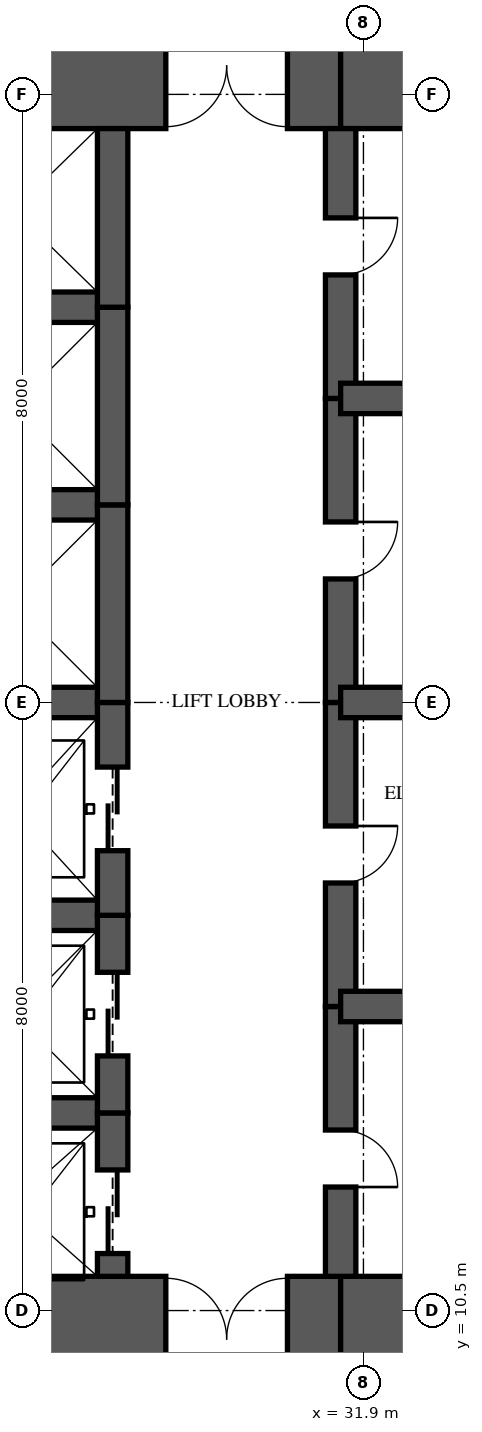
"""IFC4 building model, lengths in metres.
Left out: names, types, materials, properties, quantities, classifications, styles, units other than length and angle.
Written with IfcOpenShell. Run it as: python <this file> out.ifc"""

import sys

from ifc_helpers import new_model, si_unit, direction, frame, frame_2d, origin, place, context, subcontext, project, spatial, rectangle, extrude, element, fill, save


model = new_model("IFC4")
c1 = context("Model", 3, precision=1e-05, world=origin(), true_north=direction((0.0, 1.0)))
c2 = subcontext(c1, "Body", "Model", "MODEL_VIEW")
j1 = project(units=[si_unit("LENGTHUNIT", "METRE"), si_unit("PLANEANGLEUNIT", "RADIAN")], contexts=[c1])
p1 = place(None, origin())
s1 = spatial("IfcSite", under=j1, at=p1, CompositionType="ELEMENT")
p2 = place(p1, origin())
s2 = spatial("IfcBuilding", under=s1, at=p2, CompositionType="ELEMENT")
p3 = place(p2, frame((0.0, 0.0, 44.45)))
s3 = spatial("IfcBuildingStorey", under=s2, at=p3, CompositionType="ELEMENT", Elevation=44.45)
p4 = place(p3, frame((26.0, 10.125, 0.0), z_axis=(0.0, 0.0, 1.0), x_axis=(1.0, 0.0, 0.0)))
e1 = element("IfcWall", 1, at=p4, inside=s3, PredefinedType="SHEAR", context=c2, shape_type="SweptSolid", body=[
    extrude(rectangle(XDim=5.6, YDim=1.65, at=frame_2d((2.8, 0.0))), origin(), (0.0, 0.0, 1.0), 3.35),
])
p5 = place(p4, frame((3.3, 0.0, 0.0)))
e2 = element("IfcOpeningElement", 2, at=p5, cuts=e1, PredefinedType="OPENING", context=c2, shape_type="SweptSolid", body=[
    extrude(rectangle(XDim=1.6, YDim=2.1, at=frame_2d((0.8, 1.05))), frame((0.0, 0.835, 0.0), z_axis=(0.0, -1.0, 0.0), x_axis=(1.0, 0.0, 0.0)), (0.0, 0.0, 1.0), 1.67),
])
for number, where, z_axis, x_axis in (
    (3, (31.6, 10.125, 0.0), (0.0, 0.0, 1.0), (1.0, 0.0, 0.0)),
    (4, (35.9, 26.875, 0.0), (0.0, 0.0, 1.0), (-1.0, 0.0, 0.0)),
):
    element("IfcWall", number, at=place(p3, frame(where, z_axis=z_axis, x_axis=x_axis)), inside=s3, PredefinedType="SHEAR", context=c2, shape_type="SweptSolid", body=[
        extrude(rectangle(XDim=4.3, YDim=1.65, at=frame_2d((2.15, 0.0))), origin(), (0.0, 0.0, 1.0), 3.35),
    ])
p6 = place(p3, frame((31.6, 26.875, 0.0), z_axis=(0.0, 0.0, 1.0), x_axis=(-1.0, 0.0, 0.0)))
e5 = element("IfcWall", 5, at=p6, inside=s3, PredefinedType="SHEAR", context=c2, shape_type="SweptSolid", body=[
    extrude(rectangle(XDim=5.6, YDim=1.65, at=frame_2d((2.8, 0.0))), origin(), (0.0, 0.0, 1.0), 3.35),
])
p7 = place(p6, frame((0.7, 0.0, 0.0)))
e6 = element("IfcOpeningElement", 6, at=p7, cuts=e5, PredefinedType="OPENING", context=c2, shape_type="SweptSolid", body=[
    extrude(rectangle(XDim=1.6, YDim=2.1, at=frame_2d((0.8, 1.05))), frame((0.0, 0.835, 0.0), z_axis=(0.0, -1.0, 0.0), x_axis=(1.0, 0.0, 0.0)), (0.0, 0.0, 1.0), 1.67),
])
p8 = place(p3, frame((28.6, 10.95, 0.0), z_axis=(0.0, 0.0, 1.0), x_axis=(0.0, 1.0, 0.0)))
e7 = element("IfcWall", 7, at=p8, inside=s3, PredefinedType="SHEAR", context=c2, shape_type="SweptSolid", body=[
    extrude(rectangle(XDim=2.15, YDim=0.4, at=frame_2d((1.075, 0.0))), origin(), (0.0, 0.0, 1.0), 3.35),
])
p9 = place(p8, frame((0.3, 0.0, 0.0)))
e8 = element("IfcOpeningElement", 8, at=p9, cuts=e7, PredefinedType="OPENING", context=c2, shape_type="SweptSolid", body=[
    extrude(rectangle(XDim=1.1, YDim=2.1, at=frame_2d((0.55, 1.05))), frame((0.0, 0.21, 0.0), z_axis=(0.0, -1.0, 0.0), x_axis=(1.0, 0.0, 0.0)), (0.0, 0.0, 1.0), 0.42),
])
p10 = place(p3, frame((28.6, 13.1, 0.0), z_axis=(0.0, 0.0, 1.0), x_axis=(0.0, 1.0, 0.0)))
e9 = element("IfcWall", 9, at=p10, inside=s3, PredefinedType="SHEAR", context=c2, shape_type="SweptSolid", body=[
    extrude(rectangle(XDim=2.6, YDim=0.4, at=frame_2d((1.3, 0.0))), origin(), (0.0, 0.0, 1.0), 3.35),
])
p11 = place(p10, frame((0.75, 0.0, 0.0)))
e10 = element("IfcOpeningElement", 10, at=p11, cuts=e9, PredefinedType="OPENING", context=c2, shape_type="SweptSolid", body=[
    extrude(rectangle(XDim=1.1, YDim=2.1, at=frame_2d((0.55, 1.05))), frame((0.0, 0.21, 0.0), z_axis=(0.0, -1.0, 0.0), x_axis=(1.0, 0.0, 0.0)), (0.0, 0.0, 1.0), 0.42),
])
p12 = place(p3, frame((28.6, 15.7, 0.0), z_axis=(0.0, 0.0, 1.0), x_axis=(0.0, 1.0, 0.0)))
e11 = element("IfcWall", 11, at=p12, inside=s3, PredefinedType="SHEAR", context=c2, shape_type="SweptSolid", body=[
    extrude(rectangle(XDim=2.8, YDim=0.4, at=frame_2d((1.4, 0.0))), origin(), (0.0, 0.0, 1.0), 3.35),
])
p13 = place(p12, frame((0.85, 0.0, 0.0)))
e12 = element("IfcOpeningElement", 12, at=p13, cuts=e11, PredefinedType="OPENING", context=c2, shape_type="SweptSolid", body=[
    extrude(rectangle(XDim=1.1, YDim=2.1, at=frame_2d((0.55, 1.05))), frame((0.0, 0.21, 0.0), z_axis=(0.0, -1.0, 0.0), x_axis=(1.0, 0.0, 0.0)), (0.0, 0.0, 1.0), 0.42),
])
p14 = place(p3, frame((28.6, 18.5, 0.0), z_axis=(0.0, 0.0, 1.0), x_axis=(0.0, 1.0, 0.0)))
e13 = element("IfcWall", 13, at=p14, inside=s3, PredefinedType="SHEAR", context=c2, shape_type="SweptSolid", body=[
    extrude(rectangle(XDim=2.6, YDim=0.4, at=frame_2d((1.3, 0.0))), origin(), (0.0, 0.0, 1.0), 3.35),
])
p15 = place(p3, frame((28.6, 21.1, 0.0), z_axis=(0.0, 0.0, 1.0), x_axis=(0.0, 1.0, 0.0)))
e14 = element("IfcWall", 14, at=p15, inside=s3, PredefinedType="SHEAR", context=c2, shape_type="SweptSolid", body=[
    extrude(rectangle(XDim=2.6, YDim=0.4, at=frame_2d((1.3, 0.0))), origin(), (0.0, 0.0, 1.0), 3.35),
])
p16 = place(p3, frame((28.6, 23.7, 0.0), z_axis=(0.0, 0.0, 1.0), x_axis=(0.0, 1.0, 0.0)))
e15 = element("IfcWall", 15, at=p16, inside=s3, PredefinedType="SHEAR", context=c2, shape_type="SweptSolid", body=[
    extrude(rectangle(XDim=2.35, YDim=0.4, at=frame_2d((1.175, 0.0))), origin(), (0.0, 0.0, 1.0), 3.35),
])
p17 = place(p3, frame((31.6, 10.95, 0.0), z_axis=(0.0, 0.0, 1.0), x_axis=(0.0, 1.0, 0.0)))
e16 = element("IfcWall", 16, at=p17, inside=s3, PredefinedType="SHEAR", context=c2, shape_type="SweptSolid", body=[
    extrude(rectangle(XDim=3.55, YDim=0.4, at=frame_2d((1.775, 0.0))), origin(), (0.0, 0.0, 1.0), 3.35),
])
p18 = place(p17, frame((1.175, 0.0, 0.0)))
e17 = element("IfcOpeningElement", 17, at=p18, cuts=e16, PredefinedType="OPENING", context=c2, shape_type="SweptSolid", body=[
    extrude(rectangle(XDim=0.75, YDim=2.1, at=frame_2d((0.375, 1.05))), frame((0.0, 0.21, 0.0), z_axis=(0.0, -1.0, 0.0), x_axis=(1.0, 0.0, 0.0)), (0.0, 0.0, 1.0), 0.42),
])
p19 = place(p3, frame((31.6, 14.5, 0.0), z_axis=(0.0, 0.0, 1.0), x_axis=(0.0, 1.0, 0.0)))
e18 = element("IfcWall", 18, at=p19, inside=s3, PredefinedType="SHEAR", context=c2, shape_type="SweptSolid", body=[
    extrude(rectangle(XDim=4.0, YDim=0.4, at=frame_2d((2.0, 0.0))), origin(), (0.0, 0.0, 1.0), 3.35),
])
p20 = place(p19, frame((1.625, 0.0, 0.0)))
e19 = element("IfcOpeningElement", 19, at=p20, cuts=e18, PredefinedType="OPENING", context=c2, shape_type="SweptSolid", body=[
    extrude(rectangle(XDim=0.75, YDim=2.1, at=frame_2d((0.375, 1.05))), frame((0.0, 0.21, 0.0), z_axis=(0.0, -1.0, 0.0), x_axis=(1.0, 0.0, 0.0)), (0.0, 0.0, 1.0), 0.42),
])
p21 = place(p3, frame((31.6, 18.5, 0.0), z_axis=(0.0, 0.0, 1.0), x_axis=(0.0, 1.0, 0.0)))
e20 = element("IfcWall", 20, at=p21, inside=s3, PredefinedType="SHEAR", context=c2, shape_type="SweptSolid", body=[
    extrude(rectangle(XDim=4.0, YDim=0.4, at=frame_2d((2.0, 0.0))), origin(), (0.0, 0.0, 1.0), 3.35),
])
p22 = place(p21, frame((1.625, 0.0, 0.0)))
e21 = element("IfcOpeningElement", 21, at=p22, cuts=e20, PredefinedType="OPENING", context=c2, shape_type="SweptSolid", body=[
    extrude(rectangle(XDim=0.75, YDim=2.1, at=frame_2d((0.375, 1.05))), frame((0.0, 0.21, 0.0), z_axis=(0.0, -1.0, 0.0), x_axis=(1.0, 0.0, 0.0)), (0.0, 0.0, 1.0), 0.42),
])
p23 = place(p3, frame((31.6, 22.5, 0.0), z_axis=(0.0, 0.0, 1.0), x_axis=(0.0, 1.0, 0.0)))
e22 = element("IfcWall", 22, at=p23, inside=s3, PredefinedType="SHEAR", context=c2, shape_type="SweptSolid", body=[
    extrude(rectangle(XDim=3.55, YDim=0.4, at=frame_2d((1.775, 0.0))), origin(), (0.0, 0.0, 1.0), 3.35),
])
p24 = place(p23, frame((1.625, 0.0, 0.0)))
e23 = element("IfcOpeningElement", 23, at=p24, cuts=e22, PredefinedType="OPENING", context=c2, shape_type="SweptSolid", body=[
    extrude(rectangle(XDim=0.75, YDim=2.1, at=frame_2d((0.375, 1.05))), frame((0.0, 0.21, 0.0), z_axis=(0.0, -1.0, 0.0), x_axis=(1.0, 0.0, 0.0)), (0.0, 0.0, 1.0), 0.42),
])
for number, where, z_axis, x_axis in (
    (24, (26.0, 13.1, 0.0), (0.0, 0.0, 1.0), (1.0, 0.0, 0.0)),
    (25, (26.0, 15.7, 0.0), (0.0, 0.0, 1.0), (1.0, 0.0, 0.0)),
    (26, (26.0, 18.5, 0.0), (0.0, 0.0, 1.0), (1.0, 0.0, 0.0)),
    (27, (26.0, 21.1, 0.0), (0.0, 0.0, 1.0), (1.0, 0.0, 0.0)),
    (28, (26.0, 23.7, 0.0), (0.0, 0.0, 1.0), (1.0, 0.0, 0.0)),
):
    element("IfcWall", number, at=place(p3, frame(where, z_axis=z_axis, x_axis=x_axis)), inside=s3, PredefinedType="SHEAR", context=c2, shape_type="SweptSolid", body=[
        extrude(rectangle(XDim=2.6, YDim=0.4, at=frame_2d((1.3, 0.0))), origin(), (0.0, 0.0, 1.0), 3.35),
    ])
for number, where, z_axis, x_axis in (
    (29, (31.6, 14.5, 0.0), (0.0, 0.0, 1.0), (1.0, 0.0, 0.0)),
    (30, (31.6, 18.5, 0.0), (0.0, 0.0, 1.0), (1.0, 0.0, 0.0)),
    (31, (31.6, 22.5, 0.0), (0.0, 0.0, 1.0), (1.0, 0.0, 0.0)),
):
    element("IfcWall", number, at=place(p3, frame(where, z_axis=z_axis, x_axis=x_axis)), inside=s3, PredefinedType="SHEAR", context=c2, shape_type="SweptSolid", body=[
        extrude(rectangle(XDim=4.3, YDim=0.4, at=frame_2d((2.15, 0.0))), origin(), (0.0, 0.0, 1.0), 3.35),
    ])
p25 = place(p9, origin())
e32 = element("IfcDoor", 32, at=p25, inside=s3, OperationType="SLIDING_TO_LEFT", PredefinedType="DOOR", context=c2, shape_type="SweptSolid", body=[
    extrude(rectangle(XDim=1.1, YDim=2.1, at=frame_2d((0.55, 1.05))), frame((0.0, 0.025, 0.0), z_axis=(0.0, -1.0, 0.0), x_axis=(1.0, 0.0, 0.0)), (0.0, 0.0, 1.0), 0.05),
])
fill(e8, e32)
p26 = place(p11, origin())
e33 = element("IfcDoor", 33, at=p26, inside=s3, OperationType="SLIDING_TO_LEFT", PredefinedType="DOOR", context=c2, shape_type="SweptSolid", body=[
    extrude(rectangle(XDim=1.1, YDim=2.1, at=frame_2d((0.55, 1.05))), frame((0.0, 0.025, 0.0), z_axis=(0.0, -1.0, 0.0), x_axis=(1.0, 0.0, 0.0)), (0.0, 0.0, 1.0), 0.05),
])
fill(e10, e33)
p27 = place(p13, origin())
e34 = element("IfcDoor", 34, at=p27, inside=s3, OperationType="SLIDING_TO_LEFT", PredefinedType="DOOR", context=c2, shape_type="SweptSolid", body=[
    extrude(rectangle(XDim=1.1, YDim=2.1, at=frame_2d((0.55, 1.05))), frame((0.0, 0.025, 0.0), z_axis=(0.0, -1.0, 0.0), x_axis=(1.0, 0.0, 0.0)), (0.0, 0.0, 1.0), 0.05),
])
fill(e12, e34)
p28 = place(p5, origin())
e35 = element("IfcDoor", 35, at=p28, inside=s3, OperationType="DOUBLE_DOOR_SINGLE_SWING", PredefinedType="DOOR", context=c2, shape_type="SweptSolid", body=[
    extrude(rectangle(XDim=1.6, YDim=2.1, at=frame_2d((0.8, 1.05))), frame((0.0, 0.025, 0.0), z_axis=(0.0, -1.0, 0.0), x_axis=(1.0, 0.0, 0.0)), (0.0, 0.0, 1.0), 0.05),
])
fill(e2, e35)
p29 = place(p7, origin())
e36 = element("IfcDoor", 36, at=p29, inside=s3, OperationType="DOUBLE_DOOR_SINGLE_SWING", PredefinedType="DOOR", context=c2, shape_type="SweptSolid", body=[
    extrude(rectangle(XDim=1.6, YDim=2.1, at=frame_2d((0.8, 1.05))), frame((0.0, 0.025, 0.0), z_axis=(0.0, -1.0, 0.0), x_axis=(1.0, 0.0, 0.0)), (0.0, 0.0, 1.0), 0.05),
])
fill(e6, e36)
p30 = place(p18, frame((0.75, 0.0, 0.0), z_axis=(0.0, 0.0, 1.0), x_axis=(-1.0, 0.0, 0.0)))
e37 = element("IfcDoor", 37, at=p30, inside=s3, OperationType="SINGLE_SWING_RIGHT", PredefinedType="DOOR", context=c2, shape_type="SweptSolid", body=[
    extrude(rectangle(XDim=0.75, YDim=2.1, at=frame_2d((0.375, 1.05))), frame((0.0, 0.025, 0.0), z_axis=(0.0, -1.0, 0.0), x_axis=(1.0, 0.0, 0.0)), (0.0, 0.0, 1.0), 0.05),
])
fill(e17, e37)
p31 = place(p20, frame((0.75, 0.0, 0.0), z_axis=(0.0, 0.0, 1.0), x_axis=(-1.0, 0.0, 0.0)))
e38 = element("IfcDoor", 38, at=p31, inside=s3, OperationType="SINGLE_SWING_LEFT", PredefinedType="DOOR", context=c2, shape_type="SweptSolid", body=[
    extrude(rectangle(XDim=0.75, YDim=2.1, at=frame_2d((0.375, 1.05))), frame((0.0, 0.025, 0.0), z_axis=(0.0, -1.0, 0.0), x_axis=(1.0, 0.0, 0.0)), (0.0, 0.0, 1.0), 0.05),
])
fill(e19, e38)
p32 = place(p22, frame((0.75, 0.0, 0.0), z_axis=(0.0, 0.0, 1.0), x_axis=(-1.0, 0.0, 0.0)))
e39 = element("IfcDoor", 39, at=p32, inside=s3, OperationType="SINGLE_SWING_LEFT", PredefinedType="DOOR", context=c2, shape_type="SweptSolid", body=[
    extrude(rectangle(XDim=0.75, YDim=2.1, at=frame_2d((0.375, 1.05))), frame((0.0, 0.025, 0.0), z_axis=(0.0, -1.0, 0.0), x_axis=(1.0, 0.0, 0.0)), (0.0, 0.0, 1.0), 0.05),
])
fill(e21, e39)
p33 = place(p24, frame((0.75, 0.0, 0.0), z_axis=(0.0, 0.0, 1.0), x_axis=(-1.0, 0.0, 0.0)))
e40 = element("IfcDoor", 40, at=p33, inside=s3, OperationType="SINGLE_SWING_LEFT", PredefinedType="DOOR", context=c2, shape_type="SweptSolid", body=[
    extrude(rectangle(XDim=0.75, YDim=2.1, at=frame_2d((0.375, 1.05))), frame((0.0, 0.025, 0.0), z_axis=(0.0, -1.0, 0.0), x_axis=(1.0, 0.0, 0.0)), (0.0, 0.0, 1.0), 0.05),
])
fill(e23, e40)
save(model, sys.argv[1])
